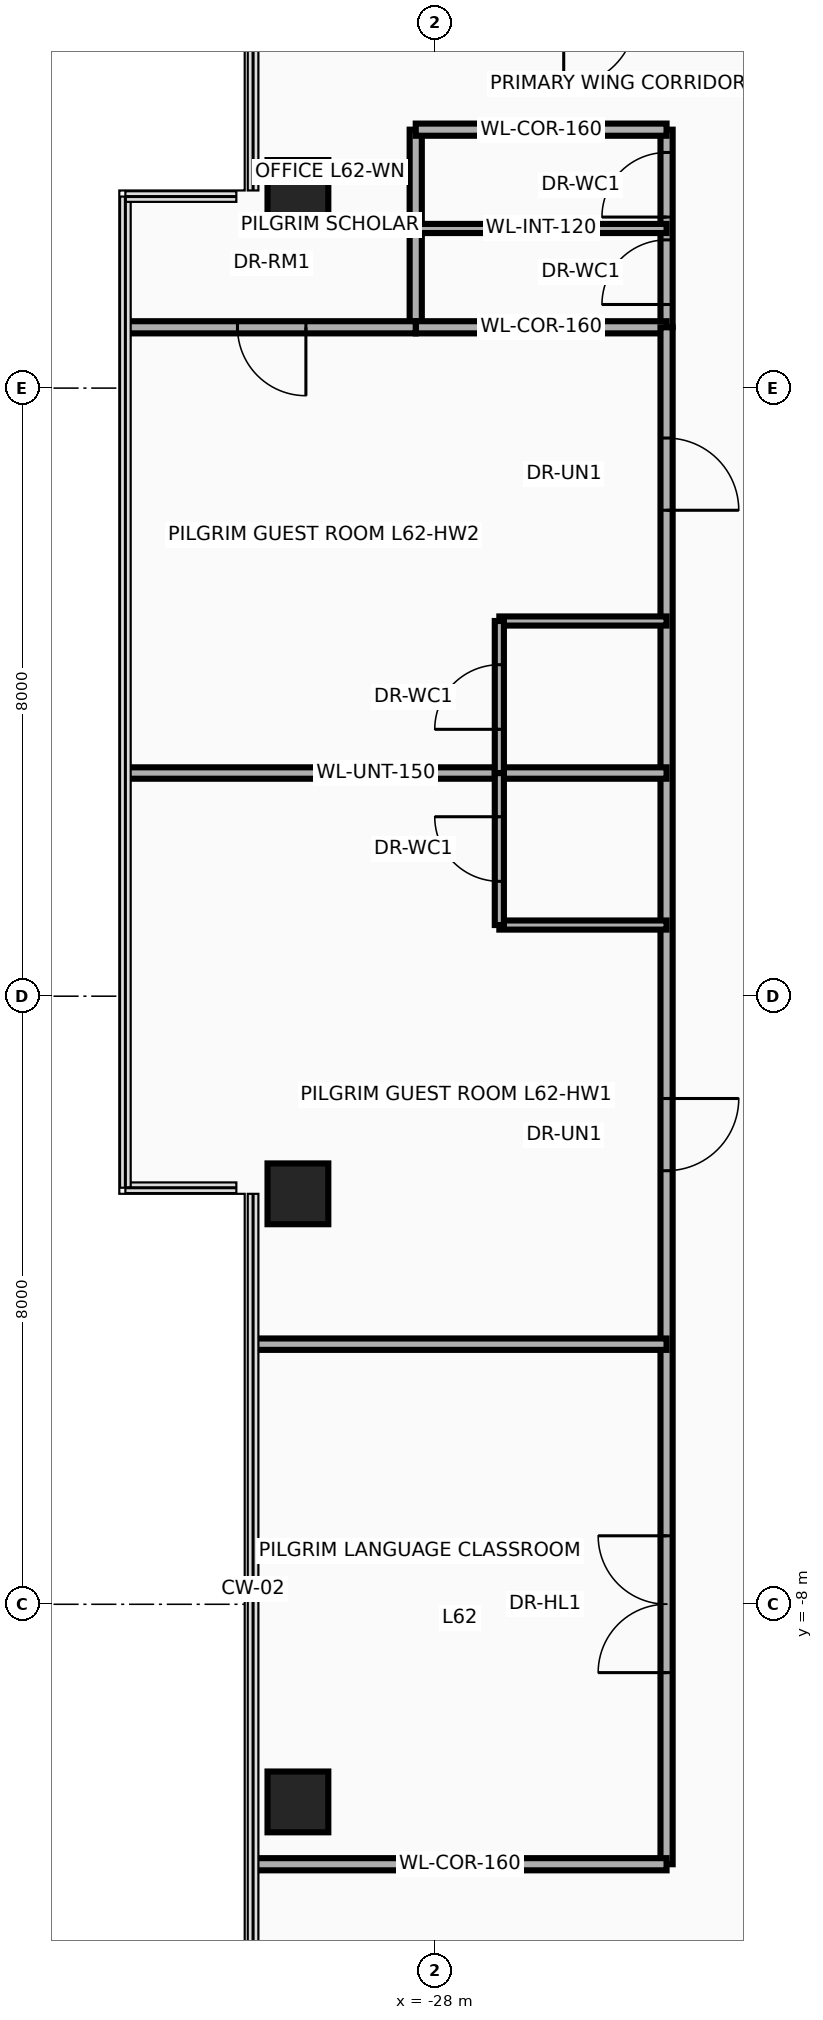
"""IFC4 building model, lengths in metres.
Left out: names, types, materials, properties, quantities, classifications, styles, units other than length and angle.
Written with IfcOpenShell. Run it as: python <this file> out.ifc"""

import sys

from ifc_helpers import new_model, si_unit, direction, frame, frame_2d, origin, origin_2d, place, context, subcontext, project, spatial, rectangle, extrude, source, transform, mapped, element, fill, save


model = new_model("IFC4")
c1 = context("Model", 3, precision=1e-05, world=origin(), true_north=direction((0.0, 1.0)))
c2 = subcontext(c1, "Body", "Model", "MODEL_VIEW")
j1 = project(units=[si_unit("LENGTHUNIT", "METRE"), si_unit("PLANEANGLEUNIT", "RADIAN")], contexts=[c1])
p1 = place(None, origin())
s1 = spatial("IfcSite", under=j1, at=p1, CompositionType="ELEMENT")
p2 = place(p1, origin())
s2 = spatial("IfcBuilding", under=s1, at=p2, CompositionType="ELEMENT")
p3 = place(p2, frame((0.0, 0.0, 240.5)))
s3 = spatial("IfcBuildingStorey", under=s2, at=p3, CompositionType="ELEMENT", Elevation=240.5)
m1 = source(origin(), c2, "Body", "SweptSolid", [
    extrude(rectangle(XDim=0.8, YDim=0.8, at=origin_2d()), origin(), (0.0, 0.0, 1.0), 3.5),
])
for number, where, z_axis, x_axis in (
    (1, (-29.8, -10.6, 0.0), (0.0, 0.0, 1.0), (1.0, 0.0, 0.0)),
    (2, (-29.8, -2.6, 0.0), (0.0, 0.0, 1.0), (1.0, 0.0, 0.0)),
    (3, (-29.8, 10.6, 0.0), (0.0, 0.0, 1.0), (1.0, 0.0, 0.0)),
):
    element("IfcColumn", number, at=place(p3, frame(where, z_axis=z_axis, x_axis=x_axis)), inside=s3, PredefinedType="COLUMN", context=c2, shape_type="MappedRepresentation", body=[
        mapped(m1, transform((0.0, 0.0, 0.0), x_axis=(1.0, 0.0, 0.0), y_axis=(0.0, 1.0, 0.0), z_axis=(0.0, 0.0, 1.0), scale=1.0)),
    ])
p4 = place(p3, frame((-28.25, 8.8, 0.0), z_axis=(0.0, 0.0, 1.0), x_axis=(0.0, 1.0, 0.0)))
e4 = element("IfcWall", 4, at=p4, inside=s3, PredefinedType="PARTITIONING", context=c2, shape_type="SweptSolid", body=[
    extrude(rectangle(XDim=2.6, YDim=0.16, at=frame_2d((1.3, 0.0))), origin(), (0.0, 0.0, 1.0), 2.544),
])
p5 = place(p3, frame((-24.95, 8.8, 0.0), z_axis=(0.0, 0.0, 1.0), x_axis=(0.0, 1.0, 0.0)))
e5 = element("IfcWall", 5, at=p5, inside=s3, PredefinedType="PARTITIONING", context=c2, shape_type="SweptSolid", body=[
    extrude(rectangle(XDim=2.6, YDim=0.16, at=frame_2d((1.3, 0.0))), origin(), (0.0, 0.0, 1.0), 2.544),
])
p6 = place(p5, frame((0.3, 0.0, 0.0)))
e6 = element("IfcOpeningElement", 6, at=p6, cuts=e5, PredefinedType="OPENING", context=c2, shape_type="SweptSolid", body=[
    extrude(rectangle(XDim=0.85, YDim=2.1, at=frame_2d((0.425, 1.05))), frame((0.0, 0.095, 0.0), z_axis=(0.0, -1.0, 0.0), x_axis=(1.0, 0.0, 0.0)), (0.0, 0.0, 1.0), 0.19),
])
p7 = place(p5, frame((1.45, 0.0, 0.0)))
e7 = element("IfcOpeningElement", 7, at=p7, cuts=e5, PredefinedType="OPENING", context=c2, shape_type="SweptSolid", body=[
    extrude(rectangle(XDim=0.85, YDim=2.1, at=frame_2d((0.425, 1.05))), frame((0.0, 0.095, 0.0), z_axis=(0.0, -1.0, 0.0), x_axis=(1.0, 0.0, 0.0)), (0.0, 0.0, 1.0), 0.19),
])
for number, where, z_axis, x_axis in (
    (8, (-28.25, 8.8, 0.0), (0.0, 0.0, 1.0), (1.0, 0.0, 0.0)),
    (9, (-28.25, 11.4, 0.0), (0.0, 0.0, 1.0), (1.0, 0.0, 0.0)),
):
    element("IfcWall", number, at=place(p3, frame(where, z_axis=z_axis, x_axis=x_axis)), inside=s3, PredefinedType="PARTITIONING", context=c2, shape_type="SweptSolid", body=[
        extrude(rectangle(XDim=3.3, YDim=0.16, at=frame_2d((1.65, 0.0))), origin(), (0.0, 0.0, 1.0), 3.26),
    ])
p8 = place(p3, frame((-28.25, 10.1, 0.0), z_axis=(0.0, 0.0, 1.0), x_axis=(1.0, 0.0, 0.0)))
e10 = element("IfcWall", 10, at=p8, inside=s3, PredefinedType="PARTITIONING", context=c2, shape_type="SweptSolid", body=[
    extrude(rectangle(XDim=3.3, YDim=0.12, at=frame_2d((1.65, 0.0))), origin(), (0.0, 0.0, 1.0), 3.26),
])
p9 = place(p3, frame((-24.95, -11.42, 0.0), z_axis=(0.0, 0.0, 1.0), x_axis=(0.0, 1.0, 0.0)))
e11 = element("IfcWall", 11, at=p9, inside=s3, PredefinedType="PARTITIONING", context=c2, shape_type="SweptSolid", body=[
    extrude(rectangle(XDim=20.22, YDim=0.16, at=frame_2d((10.11, 0.0))), origin(), (0.0, 0.0, 1.0), 2.544),
])
p10 = place(p9, frame((2.521, 0.0, 0.0)))
e12 = element("IfcOpeningElement", 12, at=p10, cuts=e11, PredefinedType="OPENING", context=c2, shape_type="SweptSolid", body=[
    extrude(rectangle(XDim=1.8, YDim=2.15, at=frame_2d((0.9, 1.075))), frame((0.0, 0.095, 0.0), z_axis=(0.0, -1.0, 0.0), x_axis=(1.0, 0.0, 0.0)), (0.0, 0.0, 1.0), 0.19),
])
p11 = place(p9, frame((9.124, 0.0, 0.0)))
e13 = element("IfcOpeningElement", 13, at=p11, cuts=e11, PredefinedType="OPENING", context=c2, shape_type="SweptSolid", body=[
    extrude(rectangle(XDim=0.95, YDim=2.15, at=frame_2d((0.475, 1.075))), frame((0.0, 0.095, 0.0), z_axis=(0.0, -1.0, 0.0), x_axis=(1.0, 0.0, 0.0)), (0.0, 0.0, 1.0), 0.19),
])
p12 = place(p9, frame((17.813, 0.0, 0.0)))
e14 = element("IfcOpeningElement", 14, at=p12, cuts=e11, PredefinedType="OPENING", context=c2, shape_type="SweptSolid", body=[
    extrude(rectangle(XDim=0.95, YDim=2.15, at=frame_2d((0.475, 1.075))), frame((0.0, 0.095, 0.0), z_axis=(0.0, -1.0, 0.0), x_axis=(1.0, 0.0, 0.0)), (0.0, 0.0, 1.0), 0.19),
])
p13 = place(p3, frame((-32.04, 8.8, 0.0), z_axis=(0.0, 0.0, 1.0), x_axis=(1.0, 0.0, 0.0)))
e15 = element("IfcWall", 15, at=p13, inside=s3, PredefinedType="PARTITIONING", context=c2, shape_type="SweptSolid", body=[
    extrude(rectangle(XDim=3.79, YDim=0.16, at=frame_2d((1.895, 0.0))), origin(), (0.0, 0.0, 1.0), 2.706),
])
p14 = place(p13, frame((1.445, 0.0, 0.0)))
e16 = element("IfcOpeningElement", 16, at=p14, cuts=e15, PredefinedType="OPENING", context=c2, shape_type="SweptSolid", body=[
    extrude(rectangle(XDim=0.9, YDim=2.1, at=frame_2d((0.45, 1.05))), frame((0.0, 0.095, 0.0), z_axis=(0.0, -1.0, 0.0), x_axis=(1.0, 0.0, 0.0)), (0.0, 0.0, 1.0), 0.19),
])
p15 = place(p3, frame((-30.39, -4.578, 0.0), z_axis=(0.0, 0.0, 1.0), x_axis=(1.0, 0.0, 0.0)))
e17 = element("IfcWall", 17, at=p15, inside=s3, PredefinedType="PARTITIONING", context=c2, shape_type="SweptSolid", body=[
    extrude(rectangle(XDim=5.44, YDim=0.15, at=frame_2d((2.72, 0.0))), origin(), (0.0, 0.0, 1.0), 2.706),
])
p16 = place(p3, frame((-32.04, 2.936, 0.0), z_axis=(0.0, 0.0, 1.0), x_axis=(1.0, 0.0, 0.0)))
e18 = element("IfcWall", 18, at=p16, inside=s3, PredefinedType="PARTITIONING", context=c2, shape_type="SweptSolid", body=[
    extrude(rectangle(XDim=7.09, YDim=0.15, at=frame_2d((3.545, 0.0))), origin(), (0.0, 0.0, 1.0), 2.706),
])
p17 = place(p3, frame((-27.15, 0.936, 0.0), z_axis=(0.0, 0.0, 1.0), x_axis=(1.0, 0.0, 0.0)))
e19 = element("IfcWall", 19, at=p17, inside=s3, PredefinedType="PARTITIONING", context=c2, shape_type="SweptSolid", body=[
    extrude(rectangle(XDim=2.2, YDim=0.12, at=frame_2d((1.1, 0.0))), origin(), (0.0, 0.0, 1.0), 2.839),
])
p18 = place(p3, frame((-27.15, 0.936, 0.0), z_axis=(0.0, 0.0, 1.0), x_axis=(0.0, 1.0, 0.0)))
e20 = element("IfcWall", 20, at=p18, inside=s3, PredefinedType="PARTITIONING", context=c2, shape_type="SweptSolid", body=[
    extrude(rectangle(XDim=2.0, YDim=0.12, at=frame_2d((1.0, 0.0))), origin(), (0.0, 0.0, 1.0), 2.839),
])
p19 = place(p18, frame((0.575, 0.0, 0.0)))
e21 = element("IfcOpeningElement", 21, at=p19, cuts=e20, PredefinedType="OPENING", context=c2, shape_type="SweptSolid", body=[
    extrude(rectangle(XDim=0.85, YDim=2.1, at=frame_2d((0.425, 1.05))), frame((0.0, 0.075, 0.0), z_axis=(0.0, -1.0, 0.0), x_axis=(1.0, 0.0, 0.0)), (0.0, 0.0, 1.0), 0.15),
])
p20 = place(p3, frame((-27.15, 4.936, 0.0), z_axis=(0.0, 0.0, 1.0), x_axis=(1.0, 0.0, 0.0)))
e22 = element("IfcWall", 22, at=p20, inside=s3, PredefinedType="PARTITIONING", context=c2, shape_type="SweptSolid", body=[
    extrude(rectangle(XDim=2.2, YDim=0.12, at=frame_2d((1.1, 0.0))), origin(), (0.0, 0.0, 1.0), 3.26),
])
p21 = place(p3, frame((-27.15, 2.936, 0.0), z_axis=(0.0, 0.0, 1.0), x_axis=(0.0, 1.0, 0.0)))
e23 = element("IfcWall", 23, at=p21, inside=s3, PredefinedType="PARTITIONING", context=c2, shape_type="SweptSolid", body=[
    extrude(rectangle(XDim=2.0, YDim=0.12, at=frame_2d((1.0, 0.0))), origin(), (0.0, 0.0, 1.0), 2.839),
])
p22 = place(p21, frame((0.575, 0.0, 0.0)))
e24 = element("IfcOpeningElement", 24, at=p22, cuts=e23, PredefinedType="OPENING", context=c2, shape_type="SweptSolid", body=[
    extrude(rectangle(XDim=0.85, YDim=2.1, at=frame_2d((0.425, 1.05))), frame((0.0, 0.075, 0.0), z_axis=(0.0, -1.0, 0.0), x_axis=(1.0, 0.0, 0.0)), (0.0, 0.0, 1.0), 0.15),
])
p23 = place(p3, frame((-30.39, -11.42, 0.0), z_axis=(0.0, 0.0, 1.0), x_axis=(1.0, 0.0, 0.0)))
e25 = element("IfcWall", 25, at=p23, inside=s3, PredefinedType="PARTITIONING", context=c2, shape_type="SweptSolid", body=[
    extrude(rectangle(XDim=5.44, YDim=0.16, at=frame_2d((2.72, 0.0))), origin(), (0.0, 0.0, 1.0), 3.26),
])
p24 = place(p6, origin())
e26 = element("IfcDoor", 26, at=p24, inside=s3, OperationType="SINGLE_SWING_LEFT", PredefinedType="DOOR", context=c2, shape_type="SweptSolid", body=[
    extrude(rectangle(XDim=0.85, YDim=2.1, at=frame_2d((0.425, 1.05))), frame((0.0, 0.025, 0.0), z_axis=(0.0, -1.0, 0.0), x_axis=(1.0, 0.0, 0.0)), (0.0, 0.0, 1.0), 0.05),
])
fill(e6, e26)
p25 = place(p7, origin())
e27 = element("IfcDoor", 27, at=p25, inside=s3, OperationType="SINGLE_SWING_RIGHT", PredefinedType="DOOR", context=c2, shape_type="SweptSolid", body=[
    extrude(rectangle(XDim=0.85, YDim=2.1, at=frame_2d((0.425, 1.05))), frame((0.0, 0.025, 0.0), z_axis=(0.0, -1.0, 0.0), x_axis=(1.0, 0.0, 0.0)), (0.0, 0.0, 1.0), 0.05),
])
fill(e7, e27)
p26 = place(p14, frame((0.9, 0.0, 0.0), z_axis=(0.0, 0.0, 1.0), x_axis=(-1.0, 0.0, 0.0)))
e28 = element("IfcDoor", 28, at=p26, inside=s3, OperationType="SINGLE_SWING_LEFT", PredefinedType="DOOR", context=c2, shape_type="SweptSolid", body=[
    extrude(rectangle(XDim=0.9, YDim=2.1, at=frame_2d((0.45, 1.05))), frame((0.0, 0.025, 0.0), z_axis=(0.0, -1.0, 0.0), x_axis=(1.0, 0.0, 0.0)), (0.0, 0.0, 1.0), 0.05),
])
fill(e16, e28)
p27 = place(p10, origin())
e29 = element("IfcDoor", 29, at=p27, inside=s3, OperationType="DOUBLE_DOOR_SINGLE_SWING", PredefinedType="DOOR", context=c2, shape_type="SweptSolid", body=[
    extrude(rectangle(XDim=1.8, YDim=2.15, at=frame_2d((0.9, 1.075))), frame((0.0, 0.025, 0.0), z_axis=(0.0, -1.0, 0.0), x_axis=(1.0, 0.0, 0.0)), (0.0, 0.0, 1.0), 0.05),
])
fill(e12, e29)
p28 = place(p11, frame((0.95, 0.0, 0.0), z_axis=(0.0, 0.0, 1.0), x_axis=(-1.0, 0.0, 0.0)))
e30 = element("IfcDoor", 30, at=p28, inside=s3, OperationType="SINGLE_SWING_LEFT", PredefinedType="DOOR", context=c2, shape_type="SweptSolid", body=[
    extrude(rectangle(XDim=0.95, YDim=2.15, at=frame_2d((0.475, 1.075))), frame((0.0, 0.025, 0.0), z_axis=(0.0, -1.0, 0.0), x_axis=(1.0, 0.0, 0.0)), (0.0, 0.0, 1.0), 0.05),
])
fill(e13, e30)
p29 = place(p19, origin())
e31 = element("IfcDoor", 31, at=p29, inside=s3, OperationType="SINGLE_SWING_RIGHT", PredefinedType="DOOR", context=c2, shape_type="SweptSolid", body=[
    extrude(rectangle(XDim=0.85, YDim=2.1, at=frame_2d((0.425, 1.05))), frame((0.0, 0.025, 0.0), z_axis=(0.0, -1.0, 0.0), x_axis=(1.0, 0.0, 0.0)), (0.0, 0.0, 1.0), 0.05),
])
fill(e21, e31)
p30 = place(p12, frame((0.95, 0.0, 0.0), z_axis=(0.0, 0.0, 1.0), x_axis=(-1.0, 0.0, 0.0)))
e32 = element("IfcDoor", 32, at=p30, inside=s3, OperationType="SINGLE_SWING_LEFT", PredefinedType="DOOR", context=c2, shape_type="SweptSolid", body=[
    extrude(rectangle(XDim=0.95, YDim=2.15, at=frame_2d((0.475, 1.075))), frame((0.0, 0.025, 0.0), z_axis=(0.0, -1.0, 0.0), x_axis=(1.0, 0.0, 0.0)), (0.0, 0.0, 1.0), 0.05),
])
fill(e14, e32)
p31 = place(p22, origin())
e33 = element("IfcDoor", 33, at=p31, inside=s3, OperationType="SINGLE_SWING_RIGHT", PredefinedType="DOOR", context=c2, shape_type="SweptSolid", body=[
    extrude(rectangle(XDim=0.85, YDim=2.1, at=frame_2d((0.425, 1.05))), frame((0.0, 0.025, 0.0), z_axis=(0.0, -1.0, 0.0), x_axis=(1.0, 0.0, 0.0)), (0.0, 0.0, 1.0), 0.05),
])
fill(e24, e33)
save(model, sys.argv[1])
